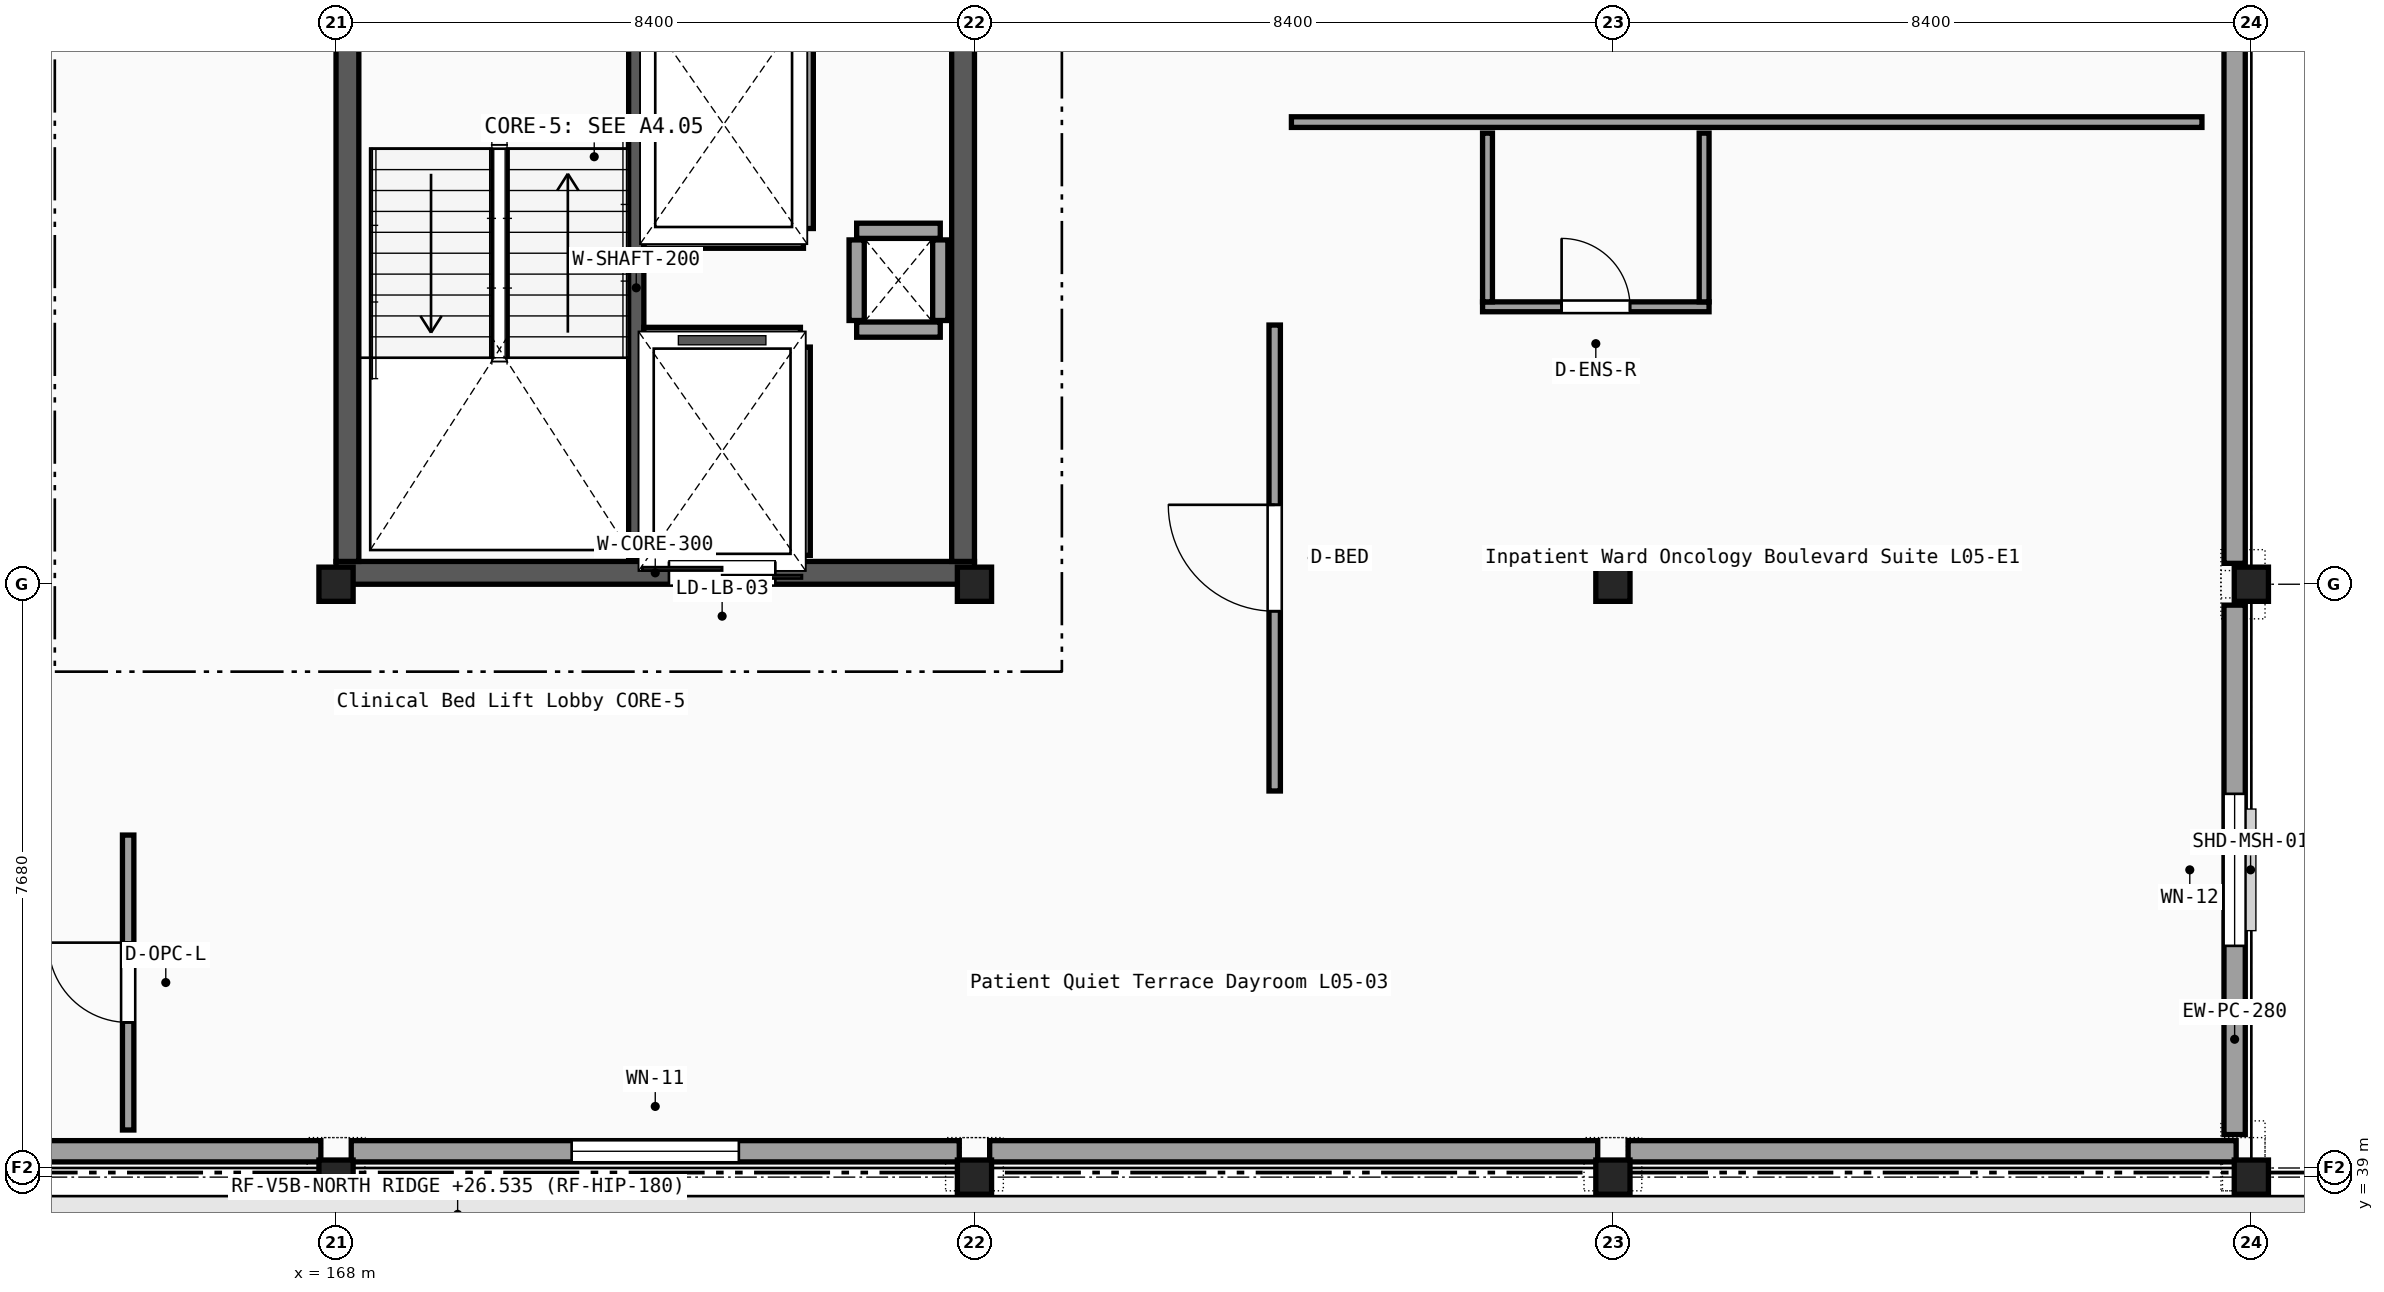
"""IFC4 building model, lengths in metres.
Left out: names, types, materials, properties, quantities, classifications, styles, units other than length and angle.
Written with IfcOpenShell. Run it as: python <this file> out.ifc"""

import sys

from ifc_helpers import new_model, si_unit, direction, frame, frame_2d, origin, origin_2d, place, context, subcontext, project, spatial, rectangle, i_section, extrude, element, fill, save


model = new_model("IFC4")
c1 = context("Model", 3, precision=1e-05, world=origin(), true_north=direction((0.0, 1.0)))
c2 = subcontext(c1, "Body", "Model", "MODEL_VIEW")
j1 = project(units=[si_unit("LENGTHUNIT", "METRE"), si_unit("PLANEANGLEUNIT", "RADIAN")], contexts=[c1])
p1 = place(None, origin())
s1 = spatial("IfcSite", under=j1, at=p1, CompositionType="ELEMENT")
p2 = place(p1, origin())
s2 = spatial("IfcBuilding", under=s1, at=p2, CompositionType="ELEMENT")
p3 = place(p2, frame((0.0, 0.0, 22.95)))
s3 = spatial("IfcBuildingStorey", under=s2, at=p3, CompositionType="ELEMENT", Elevation=22.95)
for number, where, z_axis, x_axis in (
    (1, (168.0, 39.0, 0.0), (0.0, 0.0, 1.0), (1.0, 0.0, 0.0)),
    (2, (168.0, 46.8, 0.0), (0.0, 0.0, 1.0), (1.0, 0.0, 0.0)),
    (3, (176.4, 39.0, 0.0), (0.0, 0.0, 1.0), (1.0, 0.0, 0.0)),
    (4, (176.4, 46.8, 0.0), (0.0, 0.0, 1.0), (1.0, 0.0, 0.0)),
    (5, (184.8, 39.0, 0.0), (0.0, 0.0, 1.0), (1.0, 0.0, 0.0)),
    (6, (184.8, 46.8, 0.0), (0.0, 0.0, 1.0), (1.0, 0.0, 0.0)),
    (7, (193.2, 39.0, 0.0), (0.0, 0.0, 1.0), (1.0, 0.0, 0.0)),
    (8, (193.2, 46.8, 0.0), (0.0, 0.0, 1.0), (1.0, 0.0, 0.0)),
):
    element("IfcColumn", number, at=place(p3, frame(where, z_axis=z_axis, x_axis=x_axis)), inside=s3, PredefinedType="COLUMN", context=c2, shape_type="SweptSolid", body=[
        extrude(i_section(OverallWidth=0.3, OverallDepth=0.45, WebThickness=0.014, FlangeThickness=0.026, FilletRadius=0.027, at=origin_2d()), origin(), (0.0, 0.0, 1.0), 4.05),
    ])
p4 = place(p3, frame((159.95, 39.34, 0.0), z_axis=(0.0, 0.0, 1.0), x_axis=(1.0, 0.0, 0.0)))
e9 = element("IfcWall", 9, at=p4, inside=s3, PredefinedType="SOLIDWALL", context=c2, shape_type="SweptSolid", body=[
    extrude(rectangle(XDim=7.85, YDim=0.28, at=frame_2d((3.925, 0.0))), origin(), (0.0, 0.0, 1.0), 3.51),
])
p5 = place(p3, frame((168.2, 39.34, 0.0), z_axis=(0.0, 0.0, 1.0), x_axis=(1.0, 0.0, 0.0)))
e10 = element("IfcWall", 10, at=p5, inside=s3, PredefinedType="SOLIDWALL", context=c2, shape_type="SweptSolid", body=[
    extrude(rectangle(XDim=8.0, YDim=0.28, at=frame_2d((4.0, 0.0))), origin(), (0.0, 0.0, 1.0), 3.51),
])
p6 = place(p5, frame((2.9, 0.0, 1.35)))
e11 = element("IfcOpeningElement", 11, at=p6, cuts=e10, PredefinedType="OPENING", context=c2, shape_type="SweptSolid", body=[
    extrude(rectangle(XDim=2.2, YDim=1.15, at=frame_2d((1.1, 0.575))), frame((0.0, 0.15, 0.0), z_axis=(0.0, -1.0, 0.0), x_axis=(1.0, 0.0, 0.0)), (0.0, 0.0, 1.0), 0.3),
])
for number, where, z_axis, x_axis in (
    (12, (176.6, 39.34, 0.0), (0.0, 0.0, 1.0), (1.0, 0.0, 0.0)),
    (13, (185.0, 39.34, 0.0), (0.0, 0.0, 1.0), (1.0, 0.0, 0.0)),
):
    element("IfcWall", number, at=place(p3, frame(where, z_axis=z_axis, x_axis=x_axis)), inside=s3, PredefinedType="SOLIDWALL", context=c2, shape_type="SweptSolid", body=[
        extrude(rectangle(XDim=8.0, YDim=0.28, at=frame_2d((4.0, 0.0))), origin(), (0.0, 0.0, 1.0), 3.51),
    ])
p7 = place(p3, frame((192.98, 39.56, 0.0), z_axis=(0.0, 0.0, 1.0), x_axis=(0.0, 1.0, 0.0)))
e14 = element("IfcWall", 14, at=p7, inside=s3, PredefinedType="SOLIDWALL", context=c2, shape_type="SweptSolid", body=[
    extrude(rectangle(XDim=6.965, YDim=0.28, at=frame_2d((3.482, 0.0))), origin(), (0.0, 0.0, 1.0), 3.25),
])
p8 = place(p7, frame((2.482, 0.0, 0.85)))
e15 = element("IfcOpeningElement", 15, at=p8, cuts=e14, PredefinedType="OPENING", context=c2, shape_type="SweptSolid", body=[
    extrude(rectangle(XDim=2.0, YDim=1.65, at=frame_2d((1.0, 0.825))), frame((0.0, 0.15, 0.0), z_axis=(0.0, -1.0, 0.0), x_axis=(1.0, 0.0, 0.0)), (0.0, 0.0, 1.0), 0.3),
])
p9 = place(p3, frame((192.98, 47.075, 0.0), z_axis=(0.0, 0.0, 1.0), x_axis=(0.0, 1.0, 0.0)))
e16 = element("IfcWall", 16, at=p9, inside=s3, PredefinedType="SOLIDWALL", context=c2, shape_type="SweptSolid", body=[
    extrude(rectangle(XDim=7.25, YDim=0.28, at=frame_2d((3.625, 0.0))), origin(), (0.0, 0.0, 1.0), 3.25),
])
p10 = place(p3, frame((168.0, 46.95, 0.0), z_axis=(0.0, 0.0, 1.0), x_axis=(1.0, 0.0, 0.0)))
e17 = element("IfcWall", 17, at=p10, inside=s3, PredefinedType="SHEAR", context=c2, shape_type="SweptSolid", body=[
    extrude(rectangle(XDim=8.4, YDim=0.3, at=frame_2d((4.2, 0.0))), origin(), (0.0, 0.0, 1.0), 3.82),
])
p11 = place(p10, frame((4.38, 0.0, 0.0)))
e18 = element("IfcOpeningElement", 18, at=p11, cuts=e17, PredefinedType="OPENING", context=c2, shape_type="SweptSolid", body=[
    extrude(rectangle(XDim=1.4, YDim=2.2, at=frame_2d((0.7, 1.1))), frame((0.0, 0.16, 0.0), z_axis=(0.0, -1.0, 0.0), x_axis=(1.0, 0.0, 0.0)), (0.0, 0.0, 1.0), 0.32),
])
for number, where, z_axis, x_axis in (
    (19, (168.15, 47.1, 0.0), (0.0, 0.0, 1.0), (0.0, 1.0, 0.0)),
    (20, (176.25, 47.1, 0.0), (0.0, 0.0, 1.0), (0.0, 1.0, 0.0)),
):
    element("IfcWall", number, at=place(p3, frame(where, z_axis=z_axis, x_axis=x_axis)), inside=s3, PredefinedType="SHEAR", context=c2, shape_type="SweptSolid", body=[
        extrude(rectangle(XDim=7.2, YDim=0.3, at=frame_2d((3.6, 0.0))), origin(), (0.0, 0.0, 1.0), 3.82),
    ])
p12 = place(p3, frame((171.95, 47.12, 0.0), z_axis=(0.0, 0.0, 1.0), x_axis=(0.0, 1.0, 0.0)))
e21 = element("IfcWall", 21, at=p12, inside=s3, PredefinedType="SHEAR", context=c2, shape_type="SweptSolid", body=[
    extrude(rectangle(XDim=7.16, YDim=0.2, at=frame_2d((3.58, 0.0))), origin(), (0.0, 0.0, 1.0), 3.82),
])
for number, where, z_axis, x_axis in (
    (22, (174.85, 50.15, 0.0), (0.0, 0.0, 1.0), (1.0, 0.0, 0.0)),
    (23, (174.85, 51.45, 0.0), (0.0, 0.0, 1.0), (1.0, 0.0, 0.0)),
):
    element("IfcWall", number, at=place(p3, frame(where, z_axis=z_axis, x_axis=x_axis)), inside=s3, PredefinedType="PARTITIONING", context=c2, shape_type="SweptSolid", body=[
        extrude(rectangle(XDim=1.1, YDim=0.2, at=frame_2d((0.55, 0.0))), origin(), (0.0, 0.0, 1.0), 3.25),
    ])
for number, where, z_axis, x_axis in (
    (24, (174.85, 50.27, 0.0), (0.0, 0.0, 1.0), (0.0, 1.0, 0.0)),
    (25, (175.95, 50.27, 0.0), (0.0, 0.0, 1.0), (0.0, 1.0, 0.0)),
):
    element("IfcWall", number, at=place(p3, frame(where, z_axis=z_axis, x_axis=x_axis)), inside=s3, PredefinedType="PARTITIONING", context=c2, shape_type="SweptSolid", body=[
        extrude(rectangle(XDim=1.06, YDim=0.2, at=frame_2d((0.53, 0.0))), origin(), (0.0, 0.0, 1.0), 3.25),
    ])
p13 = place(p3, frame((174.18, 51.48, 0.0), z_axis=(0.0, 0.0, 1.0), x_axis=(0.0, 1.0, 0.0)))
e26 = element("IfcWall", 26, at=p13, inside=s3, PredefinedType="PARTITIONING", context=c2, shape_type="SweptSolid", body=[
    extrude(rectangle(XDim=2.74, YDim=0.2, at=frame_2d((1.37, 0.0))), origin(), (0.0, 0.0, 1.0), 3.25),
])
p14 = place(p3, frame((172.05, 51.32, 0.0), z_axis=(0.0, 0.0, 1.0), x_axis=(1.0, 0.0, 0.0)))
e27 = element("IfcWall", 27, at=p14, inside=s3, PredefinedType="PARTITIONING", context=c2, shape_type="SweptSolid", body=[
    extrude(rectangle(XDim=2.1, YDim=0.2, at=frame_2d((1.05, 0.0))), origin(), (0.0, 0.0, 1.0), 3.25),
])
p15 = place(p3, frame((174.14, 47.18, 0.0), z_axis=(0.0, 0.0, 1.0), x_axis=(0.0, 1.0, 0.0)))
e28 = element("IfcWall", 28, at=p15, inside=s3, PredefinedType="PARTITIONING", context=c2, shape_type="SweptSolid", body=[
    extrude(rectangle(XDim=2.74, YDim=0.2, at=frame_2d((1.37, 0.0))), origin(), (0.0, 0.0, 1.0), 3.25),
])
p16 = place(p3, frame((172.05, 50.08, 0.0), z_axis=(0.0, 0.0, 1.0), x_axis=(1.0, 0.0, 0.0)))
e29 = element("IfcWall", 29, at=p16, inside=s3, PredefinedType="PARTITIONING", context=c2, shape_type="SweptSolid", body=[
    extrude(rectangle(XDim=2.06, YDim=0.2, at=frame_2d((1.03, 0.0))), origin(), (0.0, 0.0, 1.0), 3.25),
])
p17 = place(p3, frame((165.265, 39.62, 0.0), z_axis=(0.0, 0.0, 1.0), x_axis=(0.0, 1.0, 0.0)))
e30 = element("IfcWall", 30, at=p17, inside=s3, PredefinedType="PARTITIONING", context=c2, shape_type="SweptSolid", body=[
    extrude(rectangle(XDim=3.88, YDim=0.15, at=frame_2d((1.94, 0.0))), origin(), (0.0, 0.0, 1.0), 3.77),
])
p18 = place(p17, frame((1.415, 0.0, 0.0)))
e31 = element("IfcOpeningElement", 31, at=p18, cuts=e30, PredefinedType="OPENING", context=c2, shape_type="SweptSolid", body=[
    extrude(rectangle(XDim=1.05, YDim=2.15, at=frame_2d((0.525, 1.075))), frame((0.0, 0.085, 0.0), z_axis=(0.0, -1.0, 0.0), x_axis=(1.0, 0.0, 0.0)), (0.0, 0.0, 1.0), 0.17),
])
p19 = place(p3, frame((180.35, 44.08, 0.0), z_axis=(0.0, 0.0, 1.0), x_axis=(0.0, 1.0, 0.0)))
e32 = element("IfcWall", 32, at=p19, inside=s3, PredefinedType="PARTITIONING", context=c2, shape_type="SweptSolid", body=[
    extrude(rectangle(XDim=6.13, YDim=0.15, at=frame_2d((3.065, 0.0))), origin(), (0.0, 0.0, 1.0), 3.25),
])
p20 = place(p19, frame((2.365, 0.0, 0.0)))
e33 = element("IfcOpeningElement", 33, at=p20, cuts=e32, PredefinedType="OPENING", context=c2, shape_type="SweptSolid", body=[
    extrude(rectangle(XDim=1.4, YDim=2.2, at=frame_2d((0.7, 1.1))), frame((0.0, 0.085, 0.0), z_axis=(0.0, -1.0, 0.0), x_axis=(1.0, 0.0, 0.0)), (0.0, 0.0, 1.0), 0.17),
])
p21 = place(p3, frame((180.57, 52.88, 0.0), z_axis=(0.0, 0.0, 1.0), x_axis=(1.0, 0.0, 0.0)))
e34 = element("IfcWall", 34, at=p21, inside=s3, PredefinedType="PARTITIONING", context=c2, shape_type="SweptSolid", body=[
    extrude(rectangle(XDim=11.98, YDim=0.14, at=frame_2d((5.99, 0.0))), origin(), (0.0, 0.0, 1.0), 3.51),
])
p22 = place(p3, frame((183.085, 50.45, 0.0), z_axis=(0.0, 0.0, 1.0), x_axis=(1.0, 0.0, 0.0)))
e35 = element("IfcWall", 35, at=p22, inside=s3, PredefinedType="PARTITIONING", context=c2, shape_type="SweptSolid", body=[
    extrude(rectangle(XDim=2.98, YDim=0.13, at=frame_2d((1.49, 0.0))), origin(), (0.0, 0.0, 1.0), 3.51),
])
p23 = place(p22, frame((1.04, 0.0, 0.0)))
e36 = element("IfcOpeningElement", 36, at=p23, cuts=e35, PredefinedType="OPENING", context=c2, shape_type="SweptSolid", body=[
    extrude(rectangle(XDim=0.9, YDim=2.1, at=frame_2d((0.45, 1.05))), frame((0.0, 0.075, 0.0), z_axis=(0.0, -1.0, 0.0), x_axis=(1.0, 0.0, 0.0)), (0.0, 0.0, 1.0), 0.15),
])
for number, where, z_axis, x_axis in (
    (37, (183.15, 50.515, 0.0), (0.0, 0.0, 1.0), (0.0, 1.0, 0.0)),
    (38, (186.0, 50.515, 0.0), (0.0, 0.0, 1.0), (0.0, 1.0, 0.0)),
):
    element("IfcWall", number, at=place(p3, frame(where, z_axis=z_axis, x_axis=x_axis)), inside=s3, PredefinedType="PARTITIONING", context=c2, shape_type="SweptSolid", body=[
        extrude(rectangle(XDim=2.22, YDim=0.13, at=frame_2d((1.11, 0.0))), origin(), (0.0, 0.0, 1.0), 3.77),
    ])
p24 = place(p6, origin())
e39 = element("IfcWindow", 39, at=p24, inside=s3, PartitioningType="SINGLE_PANEL", PredefinedType="WINDOW", context=c2, shape_type="SweptSolid", body=[
    extrude(rectangle(XDim=2.2, YDim=1.15, at=frame_2d((1.1, 0.575))), frame((0.0, 0.03, 0.0), z_axis=(0.0, -1.0, 0.0), x_axis=(1.0, 0.0, 0.0)), (0.0, 0.0, 1.0), 0.06),
])
fill(e11, e39)
p25 = place(p8, origin())
e40 = element("IfcWindow", 40, at=p25, inside=s3, PartitioningType="SINGLE_PANEL", PredefinedType="WINDOW", context=c2, shape_type="SweptSolid", body=[
    extrude(rectangle(XDim=2.0, YDim=1.65, at=frame_2d((1.0, 0.825))), frame((0.0, 0.03, 0.0), z_axis=(0.0, -1.0, 0.0), x_axis=(1.0, 0.0, 0.0)), (0.0, 0.0, 1.0), 0.06),
])
fill(e15, e40)
p26 = place(p11, origin())
e41 = element("IfcDoor", 41, at=p26, inside=s3, OperationType="DOUBLE_DOOR_SLIDING", PredefinedType="DOOR", context=c2, shape_type="SweptSolid", body=[
    extrude(rectangle(XDim=1.4, YDim=2.2, at=frame_2d((0.7, 1.1))), frame((0.0, 0.025, 0.0), z_axis=(0.0, -1.0, 0.0), x_axis=(1.0, 0.0, 0.0)), (0.0, 0.0, 1.0), 0.05),
])
fill(e18, e41)
p27 = place(p18, origin())
e42 = element("IfcDoor", 42, at=p27, inside=s3, OperationType="SINGLE_SWING_RIGHT", PredefinedType="DOOR", context=c2, shape_type="SweptSolid", body=[
    extrude(rectangle(XDim=1.05, YDim=2.15, at=frame_2d((0.525, 1.075))), frame((0.0, 0.025, 0.0), z_axis=(0.0, -1.0, 0.0), x_axis=(1.0, 0.0, 0.0)), (0.0, 0.0, 1.0), 0.05),
])
fill(e31, e42)
p28 = place(p20, origin())
e43 = element("IfcDoor", 43, at=p28, inside=s3, OperationType="SINGLE_SWING_RIGHT", PredefinedType="DOOR", context=c2, shape_type="SweptSolid", body=[
    extrude(rectangle(XDim=1.4, YDim=2.2, at=frame_2d((0.7, 1.1))), frame((0.0, 0.025, 0.0), z_axis=(0.0, -1.0, 0.0), x_axis=(1.0, 0.0, 0.0)), (0.0, 0.0, 1.0), 0.05),
])
fill(e33, e43)
p29 = place(p23, origin())
e44 = element("IfcDoor", 44, at=p29, inside=s3, OperationType="SINGLE_SWING_LEFT", PredefinedType="DOOR", context=c2, shape_type="SweptSolid", body=[
    extrude(rectangle(XDim=0.9, YDim=2.1, at=frame_2d((0.45, 1.05))), frame((0.0, 0.025, 0.0), z_axis=(0.0, -1.0, 0.0), x_axis=(1.0, 0.0, 0.0)), (0.0, 0.0, 1.0), 0.05),
])
fill(e36, e44)
save(model, sys.argv[1])
